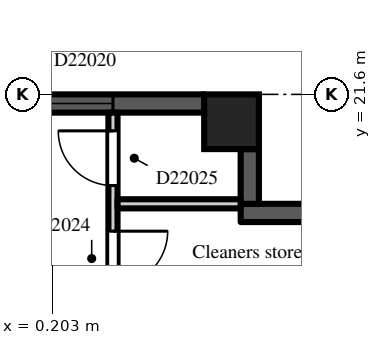
"""IFC4 building model, lengths in metres.
Left out: names, types, materials, properties, quantities, classifications, styles, units other than length and angle.
Written with IfcOpenShell. Run it as: python <this file> out.ifc"""

import sys

from ifc_helpers import new_model, si_unit, direction, frame, frame_2d, origin, origin_2d, place, context, subcontext, project, spatial, rectangle, extrude, element, fill, save


model = new_model("IFC4")
c1 = context("Model", 3, precision=1e-05, world=origin(), true_north=direction((0.0, 1.0)))
c2 = subcontext(c1, "Body", "Model", "MODEL_VIEW")
j1 = project(units=[si_unit("LENGTHUNIT", "METRE"), si_unit("PLANEANGLEUNIT", "RADIAN")], contexts=[c1])
p1 = place(None, origin())
s1 = spatial("IfcSite", under=j1, at=p1, CompositionType="ELEMENT")
p2 = place(p1, origin())
s2 = spatial("IfcBuilding", under=s1, at=p2, CompositionType="ELEMENT")
p3 = place(p2, frame((0.0, 0.0, 159.3)))
s3 = spatial("IfcBuildingStorey", under=s2, at=p3, CompositionType="ELEMENT", Elevation=159.3)
p4 = place(p3, frame((3.15, 21.15, 0.0), z_axis=(0.0, 0.0, 1.0), x_axis=(1.0, 0.0, 0.0)))
e1 = element("IfcColumn", 1, at=p4, inside=s3, PredefinedType="COLUMN", context=c2, shape_type="SweptSolid", body=[
    extrude(rectangle(XDim=0.9, YDim=0.9, at=origin_2d()), origin(), (0.0, 0.0, 1.0), 3.0),
])
p5 = place(p3, frame((5.1, 19.65, 0.0), z_axis=(0.0, 0.0, 1.0), x_axis=(-1.0, 0.0, 0.0)))
e2 = element("IfcWall", 2, at=p5, inside=s3, PredefinedType="SOLIDWALL", context=c2, shape_type="SweptSolid", body=[
    extrude(rectangle(XDim=1.8, YDim=0.3, at=frame_2d((0.9, 0.0))), origin(), (0.0, 0.0, 1.0), 2.55),
])
p6 = place(p3, frame((3.45, 19.8, 0.0), z_axis=(0.0, 0.0, 1.0), x_axis=(0.0, 1.0, 0.0)))
e3 = element("IfcWall", 3, at=p6, inside=s3, PredefinedType="SOLIDWALL", context=c2, shape_type="SweptSolid", body=[
    extrude(rectangle(XDim=0.9, YDim=0.3, at=frame_2d((0.45, 0.0))), origin(), (0.0, 0.0, 1.0), 2.55),
])
p7 = place(p3, frame((2.7, 21.45, 0.0), z_axis=(0.0, 0.0, 1.0), x_axis=(-1.0, 0.0, 0.0)))
e4 = element("IfcWall", 4, at=p7, inside=s3, PredefinedType="SOLIDWALL", context=c2, shape_type="SweptSolid", body=[
    extrude(rectangle(XDim=5.4, YDim=0.3, at=frame_2d((2.7, 0.0))), origin(), (0.0, 0.0, 1.0), 2.2),
])
p8 = place(p7, frame((1.5, 0.0, 0.2)))
e5 = element("IfcOpeningElement", 5, at=p8, cuts=e4, PredefinedType="OPENING", context=c2, shape_type="SweptSolid", body=[
    extrude(rectangle(XDim=2.4, YDim=1.85, at=frame_2d((1.2, 0.925))), frame((0.0, 0.16, 0.0), z_axis=(0.0, -1.0, 0.0), x_axis=(1.0, 0.0, 0.0)), (0.0, 0.0, 1.0), 0.32),
])
p9 = place(p3, frame((1.2, 7.125, 0.0), z_axis=(0.0, 0.0, 1.0), x_axis=(0.0, 1.0, 0.0)))
e6 = element("IfcWall", 6, at=p9, inside=s3, PredefinedType="PARTITIONING", context=c2, shape_type="SweptSolid", body=[
    extrude(rectangle(XDim=14.175, YDim=0.15, at=frame_2d((7.087, 0.0))), origin(), (0.0, 0.0, 1.0), 2.55),
])
p10 = place(p9, frame((1.425, 0.0, 0.0)))
e7 = element("IfcOpeningElement", 7, at=p10, cuts=e6, PredefinedType="OPENING", context=c2, shape_type="SweptSolid", body=[
    extrude(rectangle(XDim=0.9, YDim=2.1, at=frame_2d((0.45, 1.05))), frame((0.0, 0.085, 0.0), z_axis=(0.0, -1.0, 0.0), x_axis=(1.0, 0.0, 0.0)), (0.0, 0.0, 1.0), 0.17),
])
p11 = place(p9, frame((7.725, 0.0, 0.0)))
e8 = element("IfcOpeningElement", 8, at=p11, cuts=e6, PredefinedType="OPENING", context=c2, shape_type="SweptSolid", body=[
    extrude(rectangle(XDim=0.9, YDim=2.1, at=frame_2d((0.45, 1.05))), frame((0.0, 0.085, 0.0), z_axis=(0.0, -1.0, 0.0), x_axis=(1.0, 0.0, 0.0)), (0.0, 0.0, 1.0), 0.17),
])
p12 = place(p9, frame((9.525, 0.0, 0.0)))
e9 = element("IfcOpeningElement", 9, at=p12, cuts=e6, PredefinedType="OPENING", context=c2, shape_type="SweptSolid", body=[
    extrude(rectangle(XDim=0.9, YDim=2.1, at=frame_2d((0.45, 1.05))), frame((0.0, 0.085, 0.0), z_axis=(0.0, -1.0, 0.0), x_axis=(1.0, 0.0, 0.0)), (0.0, 0.0, 1.0), 0.17),
])
p13 = place(p9, frame((11.325, 0.0, 0.0)))
e10 = element("IfcOpeningElement", 10, at=p13, cuts=e6, PredefinedType="OPENING", context=c2, shape_type="SweptSolid", body=[
    extrude(rectangle(XDim=0.9, YDim=2.1, at=frame_2d((0.45, 1.05))), frame((0.0, 0.085, 0.0), z_axis=(0.0, -1.0, 0.0), x_axis=(1.0, 0.0, 0.0)), (0.0, 0.0, 1.0), 0.17),
])
p14 = place(p9, frame((12.975, 0.0, 0.0)))
e11 = element("IfcOpeningElement", 11, at=p14, cuts=e6, PredefinedType="OPENING", context=c2, shape_type="SweptSolid", body=[
    extrude(rectangle(XDim=0.9, YDim=2.1, at=frame_2d((0.45, 1.05))), frame((0.0, 0.085, 0.0), z_axis=(0.0, -1.0, 0.0), x_axis=(1.0, 0.0, 0.0)), (0.0, 0.0, 1.0), 0.17),
])
p15 = place(p3, frame((1.275, 19.8, 0.0), z_axis=(0.0, 0.0, 1.0), x_axis=(1.0, 0.0, 0.0)))
e12 = element("IfcWall", 12, at=p15, inside=s3, PredefinedType="PARTITIONING", context=c2, shape_type="SweptSolid", body=[
    extrude(rectangle(XDim=2.025, YDim=0.15, at=frame_2d((1.013, 0.0))), origin(), (0.0, 0.0, 1.0), 2.55),
])
p16 = place(p8, origin())
e13 = element("IfcWindow", 13, at=p16, inside=s3, PartitioningType="SINGLE_PANEL", PredefinedType="WINDOW", context=c2, shape_type="SweptSolid", body=[
    extrude(rectangle(XDim=2.4, YDim=1.85, at=frame_2d((1.2, 0.925))), frame((0.0, 0.03, 0.0), z_axis=(0.0, -1.0, 0.0), x_axis=(1.0, 0.0, 0.0)), (0.0, 0.0, 1.0), 0.06),
])
fill(e5, e13)
p17 = place(p13, frame((0.9, 0.0, 0.0), z_axis=(0.0, 0.0, 1.0), x_axis=(-1.0, 0.0, 0.0)))
e14 = element("IfcDoor", 14, at=p17, inside=s3, OperationType="SINGLE_SWING_LEFT", PredefinedType="DOOR", context=c2, shape_type="SweptSolid", body=[
    extrude(rectangle(XDim=0.9, YDim=2.1, at=frame_2d((0.45, 1.05))), frame((0.0, 0.025, 0.0), z_axis=(0.0, -1.0, 0.0), x_axis=(1.0, 0.0, 0.0)), (0.0, 0.0, 1.0), 0.05),
])
fill(e10, e14)
p18 = place(p14, origin())
e15 = element("IfcDoor", 15, at=p18, inside=s3, OperationType="SINGLE_SWING_RIGHT", PredefinedType="DOOR", context=c2, shape_type="SweptSolid", body=[
    extrude(rectangle(XDim=0.9, YDim=2.1, at=frame_2d((0.45, 1.05))), frame((0.0, 0.025, 0.0), z_axis=(0.0, -1.0, 0.0), x_axis=(1.0, 0.0, 0.0)), (0.0, 0.0, 1.0), 0.05),
])
fill(e11, e15)
save(model, sys.argv[1])
